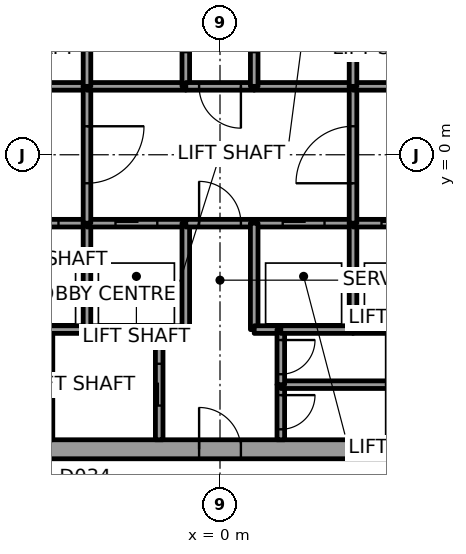
"""IFC4 building model, lengths in metres.
Left out: names, types, materials, properties, quantities, classifications, styles, units other than length and angle.
Written with IfcOpenShell. Run it as: python <this file> out.ifc"""

import sys

from ifc_helpers import new_model, si_unit, direction, frame, frame_2d, origin, place, context, subcontext, project, spatial, rectangle, extrude, element, fill, save


model = new_model("IFC4")
c1 = context("Model", 3, precision=1e-05, world=origin(), true_north=direction((0.0, 1.0)))
c2 = subcontext(c1, "Body", "Model", "MODEL_VIEW")
j1 = project(units=[si_unit("LENGTHUNIT", "METRE"), si_unit("PLANEANGLEUNIT", "RADIAN")], contexts=[c1])
p1 = place(None, origin())
s1 = spatial("IfcSite", under=j1, at=p1, CompositionType="ELEMENT")
p2 = place(p1, origin())
s2 = spatial("IfcBuilding", under=s1, at=p2, CompositionType="ELEMENT")
p3 = place(p2, frame((0.0, 0.0, 173.8)))
s3 = spatial("IfcBuildingStorey", under=s2, at=p3, CompositionType="ELEMENT", Elevation=173.8)
p4 = place(p3, frame((-11.0, -7.75, 0.0), z_axis=(0.0, 0.0, 1.0), x_axis=(1.0, 0.0, 0.0)))
e1 = element("IfcWall", 1, at=p4, inside=s3, PredefinedType="SHEAR", context=c2, shape_type="SweptSolid", body=[
    extrude(rectangle(XDim=22.0, YDim=0.5, at=frame_2d((11.0, 0.0))), origin(), (0.0, 0.0, 1.0), 4.0),
])
p5 = place(p4, frame((10.45, 0.0, 0.0)))
e2 = element("IfcOpeningElement", 2, at=p5, cuts=e1, PredefinedType="OPENING", context=c2, shape_type="SweptSolid", body=[
    extrude(rectangle(XDim=1.1, YDim=2.1, at=frame_2d((0.55, 1.05))), frame((0.0, 0.25, 0.0), z_axis=(0.0, -1.0, 0.0), x_axis=(1.0, 0.0, 0.0)), (0.0, 0.0, 1.0), 0.5),
])
p6 = place(p3, frame((-6.1, -1.8, 0.0), z_axis=(0.0, 0.0, 1.0), x_axis=(1.0, 0.0, 0.0)))
e3 = element("IfcWall", 3, at=p6, inside=s3, PredefinedType="SOLIDWALL", context=c2, shape_type="SweptSolid", body=[
    extrude(rectangle(XDim=2.6, YDim=0.2, at=frame_2d((1.3, 0.0))), origin(), (0.0, 0.0, 1.0), 3.85),
])
p7 = place(p6, frame((0.75, 0.0, 0.0)))
e4 = element("IfcOpeningElement", 4, at=p7, cuts=e3, PredefinedType="OPENING", context=c2, shape_type="SweptSolid", body=[
    extrude(rectangle(XDim=1.1, YDim=2.1, at=frame_2d((0.55, 1.05))), frame((0.0, 0.1, 0.0), z_axis=(0.0, -1.0, 0.0), x_axis=(1.0, 0.0, 0.0)), (0.0, 0.0, 1.0), 0.2),
])
p8 = place(p3, frame((-3.5, 1.8, 0.0), z_axis=(0.0, 0.0, 1.0), x_axis=(-1.0, 0.0, 0.0)))
e5 = element("IfcWall", 5, at=p8, inside=s3, PredefinedType="SOLIDWALL", context=c2, shape_type="SweptSolid", body=[
    extrude(rectangle(XDim=2.6, YDim=0.2, at=frame_2d((1.3, 0.0))), origin(), (0.0, 0.0, 1.0), 3.85),
])
p9 = place(p3, frame((-4.5, -4.6, 0.0), z_axis=(0.0, 0.0, 1.0), x_axis=(1.0, 0.0, 0.0)))
e6 = element("IfcWall", 6, at=p9, inside=s3, PredefinedType="SOLIDWALL", context=c2, shape_type="SweptSolid", body=[
    extrude(rectangle(XDim=1.0, YDim=0.2, at=frame_2d((0.5, 0.0))), origin(), (0.0, 0.0, 1.0), 3.85),
])
p10 = place(p3, frame((-3.5, -4.6, 0.0), z_axis=(0.0, 0.0, 1.0), x_axis=(1.0, 0.0, 0.0)))
e7 = element("IfcWall", 7, at=p10, inside=s3, PredefinedType="SOLIDWALL", context=c2, shape_type="SweptSolid", body=[
    extrude(rectangle(XDim=1.9, YDim=0.2, at=frame_2d((0.95, 0.0))), origin(), (0.0, 0.0, 1.0), 3.85),
])
p11 = place(p3, frame((-3.5, -4.6, 0.0), z_axis=(0.0, 0.0, 1.0), x_axis=(0.0, 1.0, 0.0)))
e8 = element("IfcWall", 8, at=p11, inside=s3, PredefinedType="SOLIDWALL", context=c2, shape_type="SweptSolid", body=[
    extrude(rectangle(XDim=2.8, YDim=0.2, at=frame_2d((1.4, 0.0))), origin(), (0.0, 0.0, 1.0), 3.85),
])
p12 = place(p3, frame((-3.5, -1.8, 0.0), z_axis=(0.0, 0.0, 1.0), x_axis=(1.0, 0.0, 0.0)))
e9 = element("IfcWall", 9, at=p12, inside=s3, PredefinedType="SOLIDWALL", context=c2, shape_type="SweptSolid", body=[
    extrude(rectangle(XDim=2.6, YDim=0.2, at=frame_2d((1.3, 0.0))), origin(), (0.0, 0.0, 1.0), 3.85),
])
p13 = place(p12, frame((0.75, 0.0, 0.0)))
e10 = element("IfcOpeningElement", 10, at=p13, cuts=e9, PredefinedType="OPENING", context=c2, shape_type="SweptSolid", body=[
    extrude(rectangle(XDim=1.1, YDim=2.1, at=frame_2d((0.55, 1.05))), frame((0.0, 0.1, 0.0), z_axis=(0.0, -1.0, 0.0), x_axis=(1.0, 0.0, 0.0)), (0.0, 0.0, 1.0), 0.2),
])
p14 = place(p3, frame((-3.5, 1.8, 0.0), z_axis=(0.0, 0.0, 1.0), x_axis=(0.0, -1.0, 0.0)))
e11 = element("IfcWall", 11, at=p14, inside=s3, PredefinedType="SOLIDWALL", context=c2, shape_type="SweptSolid", body=[
    extrude(rectangle(XDim=3.6, YDim=0.2, at=frame_2d((1.8, 0.0))), origin(), (0.0, 0.0, 1.0), 3.85),
])
p15 = place(p14, frame((1.05, 0.0, 0.0)))
e12 = element("IfcOpeningElement", 12, at=p15, cuts=e11, PredefinedType="OPENING", context=c2, shape_type="SweptSolid", body=[
    extrude(rectangle(XDim=1.5, YDim=2.1, at=frame_2d((0.75, 1.05))), frame((0.0, 0.1, 0.0), z_axis=(0.0, -1.0, 0.0), x_axis=(1.0, 0.0, 0.0)), (0.0, 0.0, 1.0), 0.2),
])
p16 = place(p3, frame((-0.9, 1.8, 0.0), z_axis=(0.0, 0.0, 1.0), x_axis=(-1.0, 0.0, 0.0)))
e13 = element("IfcWall", 13, at=p16, inside=s3, PredefinedType="SOLIDWALL", context=c2, shape_type="SweptSolid", body=[
    extrude(rectangle(XDim=2.6, YDim=0.2, at=frame_2d((1.3, 0.0))), origin(), (0.0, 0.0, 1.0), 3.85),
])
p17 = place(p3, frame((-3.5, 4.6, 0.0), z_axis=(0.0, 0.0, 1.0), x_axis=(0.0, -1.0, 0.0)))
e14 = element("IfcWall", 14, at=p17, inside=s3, PredefinedType="SOLIDWALL", context=c2, shape_type="SweptSolid", body=[
    extrude(rectangle(XDim=2.8, YDim=0.2, at=frame_2d((1.4, 0.0))), origin(), (0.0, 0.0, 1.0), 3.85),
])
p18 = place(p3, frame((-0.9, 1.8, 0.0), z_axis=(0.0, 0.0, 1.0), x_axis=(0.0, 1.0, 0.0)))
e15 = element("IfcWall", 15, at=p18, inside=s3, PredefinedType="SOLIDWALL", context=c2, shape_type="SweptSolid", body=[
    extrude(rectangle(XDim=3.0, YDim=0.2, at=frame_2d((1.5, 0.0))), origin(), (0.0, 0.0, 1.0), 3.85),
])
p19 = place(p18, frame((0.9, 0.0, 0.0)))
e16 = element("IfcOpeningElement", 16, at=p19, cuts=e15, PredefinedType="OPENING", context=c2, shape_type="SweptSolid", body=[
    extrude(rectangle(XDim=1.2, YDim=2.1, at=frame_2d((0.6, 1.05))), frame((0.0, 0.1, 0.0), z_axis=(0.0, -1.0, 0.0), x_axis=(1.0, 0.0, 0.0)), (0.0, 0.0, 1.0), 0.2),
])
p20 = place(p3, frame((-1.6, -7.5, 0.0), z_axis=(0.0, 0.0, 1.0), x_axis=(0.0, 1.0, 0.0)))
e17 = element("IfcWall", 17, at=p20, inside=s3, PredefinedType="SOLIDWALL", context=c2, shape_type="SweptSolid", body=[
    extrude(rectangle(XDim=2.9, YDim=0.2, at=frame_2d((1.45, 0.0))), origin(), (0.0, 0.0, 1.0), 3.85),
])
p21 = place(p20, frame((0.9, 0.0, 0.0)))
e18 = element("IfcOpeningElement", 18, at=p21, cuts=e17, PredefinedType="OPENING", context=c2, shape_type="SweptSolid", body=[
    extrude(rectangle(XDim=1.1, YDim=2.1, at=frame_2d((0.55, 1.05))), frame((0.0, 0.1, 0.0), z_axis=(0.0, -1.0, 0.0), x_axis=(1.0, 0.0, 0.0)), (0.0, 0.0, 1.0), 0.2),
])
p22 = place(p3, frame((-1.6, -4.6, 0.0), z_axis=(0.0, 0.0, 1.0), x_axis=(1.0, 0.0, 0.0)))
e19 = element("IfcWall", 19, at=p22, inside=s3, PredefinedType="SOLIDWALL", context=c2, shape_type="SweptSolid", body=[
    extrude(rectangle(XDim=0.7, YDim=0.2, at=frame_2d((0.35, 0.0))), origin(), (0.0, 0.0, 1.0), 3.85),
])
p23 = place(p3, frame((-0.9, -4.6, 0.0), z_axis=(0.0, 0.0, 1.0), x_axis=(0.0, 1.0, 0.0)))
e20 = element("IfcWall", 20, at=p23, inside=s3, PredefinedType="SOLIDWALL", context=c2, shape_type="SweptSolid", body=[
    extrude(rectangle(XDim=2.8, YDim=0.2, at=frame_2d((1.4, 0.0))), origin(), (0.0, 0.0, 1.0), 3.85),
])
p24 = place(p3, frame((-0.9, -1.8, 0.0), z_axis=(0.0, 0.0, 1.0), x_axis=(1.0, 0.0, 0.0)))
e21 = element("IfcWall", 21, at=p24, inside=s3, PredefinedType="SOLIDWALL", context=c2, shape_type="SweptSolid", body=[
    extrude(rectangle(XDim=1.8, YDim=0.2, at=frame_2d((0.9, 0.0))), origin(), (0.0, 0.0, 1.0), 3.85),
])
p25 = place(p24, frame((0.35, 0.0, 0.0)))
e22 = element("IfcOpeningElement", 22, at=p25, cuts=e21, PredefinedType="OPENING", context=c2, shape_type="SweptSolid", body=[
    extrude(rectangle(XDim=1.1, YDim=2.1, at=frame_2d((0.55, 1.05))), frame((0.0, 0.1, 0.0), z_axis=(0.0, -1.0, 0.0), x_axis=(1.0, 0.0, 0.0)), (0.0, 0.0, 1.0), 0.2),
])
p26 = place(p3, frame((0.9, 1.8, 0.0), z_axis=(0.0, 0.0, 1.0), x_axis=(-1.0, 0.0, 0.0)))
e23 = element("IfcWall", 23, at=p26, inside=s3, PredefinedType="SOLIDWALL", context=c2, shape_type="SweptSolid", body=[
    extrude(rectangle(XDim=1.8, YDim=0.2, at=frame_2d((0.9, 0.0))), origin(), (0.0, 0.0, 1.0), 3.85),
])
p27 = place(p26, frame((0.35, 0.0, 0.0)))
e24 = element("IfcOpeningElement", 24, at=p27, cuts=e23, PredefinedType="OPENING", context=c2, shape_type="SweptSolid", body=[
    extrude(rectangle(XDim=1.1, YDim=2.1, at=frame_2d((0.55, 1.05))), frame((0.0, 0.1, 0.0), z_axis=(0.0, -1.0, 0.0), x_axis=(1.0, 0.0, 0.0)), (0.0, 0.0, 1.0), 0.2),
])
p28 = place(p3, frame((0.9, -1.8, 0.0), z_axis=(0.0, 0.0, 1.0), x_axis=(1.0, 0.0, 0.0)))
e25 = element("IfcWall", 25, at=p28, inside=s3, PredefinedType="SOLIDWALL", context=c2, shape_type="SweptSolid", body=[
    extrude(rectangle(XDim=2.6, YDim=0.2, at=frame_2d((1.3, 0.0))), origin(), (0.0, 0.0, 1.0), 3.85),
])
p29 = place(p28, frame((0.75, 0.0, 0.0)))
e26 = element("IfcOpeningElement", 26, at=p29, cuts=e25, PredefinedType="OPENING", context=c2, shape_type="SweptSolid", body=[
    extrude(rectangle(XDim=1.1, YDim=2.1, at=frame_2d((0.55, 1.05))), frame((0.0, 0.1, 0.0), z_axis=(0.0, -1.0, 0.0), x_axis=(1.0, 0.0, 0.0)), (0.0, 0.0, 1.0), 0.2),
])
p30 = place(p3, frame((0.9, -1.8, 0.0), z_axis=(0.0, 0.0, 1.0), x_axis=(0.0, -1.0, 0.0)))
e27 = element("IfcWall", 27, at=p30, inside=s3, PredefinedType="SOLIDWALL", context=c2, shape_type="SweptSolid", body=[
    extrude(rectangle(XDim=2.8, YDim=0.2, at=frame_2d((1.4, 0.0))), origin(), (0.0, 0.0, 1.0), 3.85),
])
p31 = place(p3, frame((0.9, -4.6, 0.0), z_axis=(0.0, 0.0, 1.0), x_axis=(1.0, 0.0, 0.0)))
e28 = element("IfcWall", 28, at=p31, inside=s3, PredefinedType="SOLIDWALL", context=c2, shape_type="SweptSolid", body=[
    extrude(rectangle(XDim=0.7, YDim=0.2, at=frame_2d((0.35, 0.0))), origin(), (0.0, 0.0, 1.0), 3.85),
])
p32 = place(p3, frame((3.5, 1.8, 0.0), z_axis=(0.0, 0.0, 1.0), x_axis=(-1.0, 0.0, 0.0)))
e29 = element("IfcWall", 29, at=p32, inside=s3, PredefinedType="SOLIDWALL", context=c2, shape_type="SweptSolid", body=[
    extrude(rectangle(XDim=2.6, YDim=0.2, at=frame_2d((1.3, 0.0))), origin(), (0.0, 0.0, 1.0), 3.85),
])
p33 = place(p3, frame((0.9, 4.8, 0.0), z_axis=(0.0, 0.0, 1.0), x_axis=(0.0, -1.0, 0.0)))
e30 = element("IfcWall", 30, at=p33, inside=s3, PredefinedType="SOLIDWALL", context=c2, shape_type="SweptSolid", body=[
    extrude(rectangle(XDim=3.0, YDim=0.2, at=frame_2d((1.5, 0.0))), origin(), (0.0, 0.0, 1.0), 3.85),
])
p34 = place(p33, frame((0.9, 0.0, 0.0)))
e31 = element("IfcOpeningElement", 31, at=p34, cuts=e30, PredefinedType="OPENING", context=c2, shape_type="SweptSolid", body=[
    extrude(rectangle(XDim=1.2, YDim=2.1, at=frame_2d((0.6, 1.05))), frame((0.0, 0.1, 0.0), z_axis=(0.0, -1.0, 0.0), x_axis=(1.0, 0.0, 0.0)), (0.0, 0.0, 1.0), 0.2),
])
p35 = place(p3, frame((1.6, -6.05, 0.0), z_axis=(0.0, 0.0, 1.0), x_axis=(0.0, -1.0, 0.0)))
e32 = element("IfcWall", 32, at=p35, inside=s3, PredefinedType="SOLIDWALL", context=c2, shape_type="SweptSolid", body=[
    extrude(rectangle(XDim=1.45, YDim=0.2, at=frame_2d((0.725, 0.0))), origin(), (0.0, 0.0, 1.0), 3.85),
])
p36 = place(p35, frame((0.275, 0.0, 0.0)))
e33 = element("IfcOpeningElement", 33, at=p36, cuts=e32, PredefinedType="OPENING", context=c2, shape_type="SweptSolid", body=[
    extrude(rectangle(XDim=0.9, YDim=2.1, at=frame_2d((0.45, 1.05))), frame((0.0, 0.1, 0.0), z_axis=(0.0, -1.0, 0.0), x_axis=(1.0, 0.0, 0.0)), (0.0, 0.0, 1.0), 0.2),
])
p37 = place(p3, frame((4.5, -6.05, 0.0), z_axis=(0.0, 0.0, 1.0), x_axis=(-1.0, 0.0, 0.0)))
e34 = element("IfcWall", 34, at=p37, inside=s3, PredefinedType="SOLIDWALL", context=c2, shape_type="SweptSolid", body=[
    extrude(rectangle(XDim=2.9, YDim=0.2, at=frame_2d((1.45, 0.0))), origin(), (0.0, 0.0, 1.0), 3.85),
])
p38 = place(p3, frame((1.6, -4.6, 0.0), z_axis=(0.0, 0.0, 1.0), x_axis=(0.0, -1.0, 0.0)))
e35 = element("IfcWall", 35, at=p38, inside=s3, PredefinedType="SOLIDWALL", context=c2, shape_type="SweptSolid", body=[
    extrude(rectangle(XDim=1.45, YDim=0.2, at=frame_2d((0.725, 0.0))), origin(), (0.0, 0.0, 1.0), 3.85),
])
p39 = place(p38, frame((0.275, 0.0, 0.0)))
e36 = element("IfcOpeningElement", 36, at=p39, cuts=e35, PredefinedType="OPENING", context=c2, shape_type="SweptSolid", body=[
    extrude(rectangle(XDim=0.9, YDim=2.1, at=frame_2d((0.45, 1.05))), frame((0.0, 0.1, 0.0), z_axis=(0.0, -1.0, 0.0), x_axis=(1.0, 0.0, 0.0)), (0.0, 0.0, 1.0), 0.2),
])
p40 = place(p3, frame((3.5, -4.6, 0.0), z_axis=(0.0, 0.0, 1.0), x_axis=(-1.0, 0.0, 0.0)))
e37 = element("IfcWall", 37, at=p40, inside=s3, PredefinedType="SOLIDWALL", context=c2, shape_type="SweptSolid", body=[
    extrude(rectangle(XDim=1.9, YDim=0.2, at=frame_2d((0.95, 0.0))), origin(), (0.0, 0.0, 1.0), 3.85),
])
p41 = place(p3, frame((4.5, -4.6, 0.0), z_axis=(0.0, 0.0, 1.0), x_axis=(-1.0, 0.0, 0.0)))
e38 = element("IfcWall", 38, at=p41, inside=s3, PredefinedType="SOLIDWALL", context=c2, shape_type="SweptSolid", body=[
    extrude(rectangle(XDim=1.0, YDim=0.2, at=frame_2d((0.5, 0.0))), origin(), (0.0, 0.0, 1.0), 3.85),
])
p42 = place(p3, frame((3.5, -4.6, 0.0), z_axis=(0.0, 0.0, 1.0), x_axis=(0.0, 1.0, 0.0)))
e39 = element("IfcWall", 39, at=p42, inside=s3, PredefinedType="SOLIDWALL", context=c2, shape_type="SweptSolid", body=[
    extrude(rectangle(XDim=2.8, YDim=0.2, at=frame_2d((1.4, 0.0))), origin(), (0.0, 0.0, 1.0), 3.85),
])
p43 = place(p3, frame((3.5, -1.8, 0.0), z_axis=(0.0, 0.0, 1.0), x_axis=(1.0, 0.0, 0.0)))
e40 = element("IfcWall", 40, at=p43, inside=s3, PredefinedType="SOLIDWALL", context=c2, shape_type="SweptSolid", body=[
    extrude(rectangle(XDim=2.6, YDim=0.2, at=frame_2d((1.3, 0.0))), origin(), (0.0, 0.0, 1.0), 3.85),
])
p44 = place(p43, frame((0.75, 0.0, 0.0)))
e41 = element("IfcOpeningElement", 41, at=p44, cuts=e40, PredefinedType="OPENING", context=c2, shape_type="SweptSolid", body=[
    extrude(rectangle(XDim=1.1, YDim=2.1, at=frame_2d((0.55, 1.05))), frame((0.0, 0.1, 0.0), z_axis=(0.0, -1.0, 0.0), x_axis=(1.0, 0.0, 0.0)), (0.0, 0.0, 1.0), 0.2),
])
p45 = place(p3, frame((3.5, -1.8, 0.0), z_axis=(0.0, 0.0, 1.0), x_axis=(0.0, 1.0, 0.0)))
e42 = element("IfcWall", 42, at=p45, inside=s3, PredefinedType="SOLIDWALL", context=c2, shape_type="SweptSolid", body=[
    extrude(rectangle(XDim=3.6, YDim=0.2, at=frame_2d((1.8, 0.0))), origin(), (0.0, 0.0, 1.0), 3.85),
])
p46 = place(p45, frame((1.05, 0.0, 0.0)))
e43 = element("IfcOpeningElement", 43, at=p46, cuts=e42, PredefinedType="OPENING", context=c2, shape_type="SweptSolid", body=[
    extrude(rectangle(XDim=1.5, YDim=2.1, at=frame_2d((0.75, 1.05))), frame((0.0, 0.1, 0.0), z_axis=(0.0, -1.0, 0.0), x_axis=(1.0, 0.0, 0.0)), (0.0, 0.0, 1.0), 0.2),
])
p47 = place(p3, frame((6.1, 1.8, 0.0), z_axis=(0.0, 0.0, 1.0), x_axis=(-1.0, 0.0, 0.0)))
e44 = element("IfcWall", 44, at=p47, inside=s3, PredefinedType="SOLIDWALL", context=c2, shape_type="SweptSolid", body=[
    extrude(rectangle(XDim=2.6, YDim=0.2, at=frame_2d((1.3, 0.0))), origin(), (0.0, 0.0, 1.0), 3.85),
])
p48 = place(p3, frame((3.5, 1.8, 0.0), z_axis=(0.0, 0.0, 1.0), x_axis=(0.0, 1.0, 0.0)))
e45 = element("IfcWall", 45, at=p48, inside=s3, PredefinedType="SOLIDWALL", context=c2, shape_type="SweptSolid", body=[
    extrude(rectangle(XDim=2.8, YDim=0.2, at=frame_2d((1.4, 0.0))), origin(), (0.0, 0.0, 1.0), 3.85),
])
p49 = place(p7, origin())
e46 = element("IfcDoor", 46, at=p49, inside=s3, OperationType="SLIDING_TO_RIGHT", PredefinedType="DOOR", context=c2, shape_type="SweptSolid", body=[
    extrude(rectangle(XDim=1.1, YDim=2.1, at=frame_2d((0.55, 1.05))), frame((0.0, 0.025, 0.0), z_axis=(0.0, -1.0, 0.0), x_axis=(1.0, 0.0, 0.0)), (0.0, 0.0, 1.0), 0.05),
])
fill(e4, e46)
p50 = place(p13, origin())
e47 = element("IfcDoor", 47, at=p50, inside=s3, OperationType="SLIDING_TO_LEFT", PredefinedType="DOOR", context=c2, shape_type="SweptSolid", body=[
    extrude(rectangle(XDim=1.1, YDim=2.1, at=frame_2d((0.55, 1.05))), frame((0.0, 0.025, 0.0), z_axis=(0.0, -1.0, 0.0), x_axis=(1.0, 0.0, 0.0)), (0.0, 0.0, 1.0), 0.05),
])
fill(e10, e47)
p51 = place(p29, origin())
e48 = element("IfcDoor", 48, at=p51, inside=s3, OperationType="SLIDING_TO_LEFT", PredefinedType="DOOR", context=c2, shape_type="SweptSolid", body=[
    extrude(rectangle(XDim=1.1, YDim=2.1, at=frame_2d((0.55, 1.05))), frame((0.0, 0.025, 0.0), z_axis=(0.0, -1.0, 0.0), x_axis=(1.0, 0.0, 0.0)), (0.0, 0.0, 1.0), 0.05),
])
fill(e26, e48)
p52 = place(p44, origin())
e49 = element("IfcDoor", 49, at=p52, inside=s3, OperationType="SLIDING_TO_LEFT", PredefinedType="DOOR", context=c2, shape_type="SweptSolid", body=[
    extrude(rectangle(XDim=1.1, YDim=2.1, at=frame_2d((0.55, 1.05))), frame((0.0, 0.025, 0.0), z_axis=(0.0, -1.0, 0.0), x_axis=(1.0, 0.0, 0.0)), (0.0, 0.0, 1.0), 0.05),
])
fill(e41, e49)
p53 = place(p21, origin())
e50 = element("IfcDoor", 50, at=p53, inside=s3, OperationType="SLIDING_TO_LEFT", PredefinedType="DOOR", context=c2, shape_type="SweptSolid", body=[
    extrude(rectangle(XDim=1.1, YDim=2.1, at=frame_2d((0.55, 1.05))), frame((0.0, 0.025, 0.0), z_axis=(0.0, -1.0, 0.0), x_axis=(1.0, 0.0, 0.0)), (0.0, 0.0, 1.0), 0.05),
])
fill(e18, e50)
p54 = place(p15, origin())
e51 = element("IfcDoor", 51, at=p54, inside=s3, OperationType="DOUBLE_DOOR_SINGLE_SWING", PredefinedType="DOOR", context=c2, shape_type="SweptSolid", body=[
    extrude(rectangle(XDim=1.5, YDim=2.1, at=frame_2d((0.75, 1.05))), frame((0.0, 0.025, 0.0), z_axis=(0.0, -1.0, 0.0), x_axis=(1.0, 0.0, 0.0)), (0.0, 0.0, 1.0), 0.05),
])
fill(e12, e51)
p55 = place(p46, origin())
e52 = element("IfcDoor", 52, at=p55, inside=s3, OperationType="DOUBLE_DOOR_SINGLE_SWING", PredefinedType="DOOR", context=c2, shape_type="SweptSolid", body=[
    extrude(rectangle(XDim=1.5, YDim=2.1, at=frame_2d((0.75, 1.05))), frame((0.0, 0.025, 0.0), z_axis=(0.0, -1.0, 0.0), x_axis=(1.0, 0.0, 0.0)), (0.0, 0.0, 1.0), 0.05),
])
fill(e43, e52)
p56 = place(p27, origin())
e53 = element("IfcDoor", 53, at=p56, inside=s3, OperationType="SINGLE_SWING_RIGHT", PredefinedType="DOOR", context=c2, shape_type="SweptSolid", body=[
    extrude(rectangle(XDim=1.1, YDim=2.1, at=frame_2d((0.55, 1.05))), frame((0.0, 0.025, 0.0), z_axis=(0.0, -1.0, 0.0), x_axis=(1.0, 0.0, 0.0)), (0.0, 0.0, 1.0), 0.05),
])
fill(e24, e53)
p57 = place(p25, origin())
e54 = element("IfcDoor", 54, at=p57, inside=s3, OperationType="SINGLE_SWING_RIGHT", PredefinedType="DOOR", context=c2, shape_type="SweptSolid", body=[
    extrude(rectangle(XDim=1.1, YDim=2.1, at=frame_2d((0.55, 1.05))), frame((0.0, 0.025, 0.0), z_axis=(0.0, -1.0, 0.0), x_axis=(1.0, 0.0, 0.0)), (0.0, 0.0, 1.0), 0.05),
])
fill(e22, e54)
p58 = place(p36, origin())
e55 = element("IfcDoor", 55, at=p58, inside=s3, OperationType="SINGLE_SWING_LEFT", PredefinedType="DOOR", context=c2, shape_type="SweptSolid", body=[
    extrude(rectangle(XDim=0.9, YDim=2.1, at=frame_2d((0.45, 1.05))), frame((0.0, 0.025, 0.0), z_axis=(0.0, -1.0, 0.0), x_axis=(1.0, 0.0, 0.0)), (0.0, 0.0, 1.0), 0.05),
])
fill(e33, e55)
p59 = place(p39, origin())
e56 = element("IfcDoor", 56, at=p59, inside=s3, OperationType="SINGLE_SWING_LEFT", PredefinedType="DOOR", context=c2, shape_type="SweptSolid", body=[
    extrude(rectangle(XDim=0.9, YDim=2.1, at=frame_2d((0.45, 1.05))), frame((0.0, 0.025, 0.0), z_axis=(0.0, -1.0, 0.0), x_axis=(1.0, 0.0, 0.0)), (0.0, 0.0, 1.0), 0.05),
])
fill(e36, e56)
p60 = place(p5, origin())
e57 = element("IfcDoor", 57, at=p60, inside=s3, OperationType="SINGLE_SWING_RIGHT", PredefinedType="DOOR", context=c2, shape_type="SweptSolid", body=[
    extrude(rectangle(XDim=1.1, YDim=2.1, at=frame_2d((0.55, 1.05))), frame((0.0, 0.025, 0.0), z_axis=(0.0, -1.0, 0.0), x_axis=(1.0, 0.0, 0.0)), (0.0, 0.0, 1.0), 0.05),
])
fill(e2, e57)
save(model, sys.argv[1])
